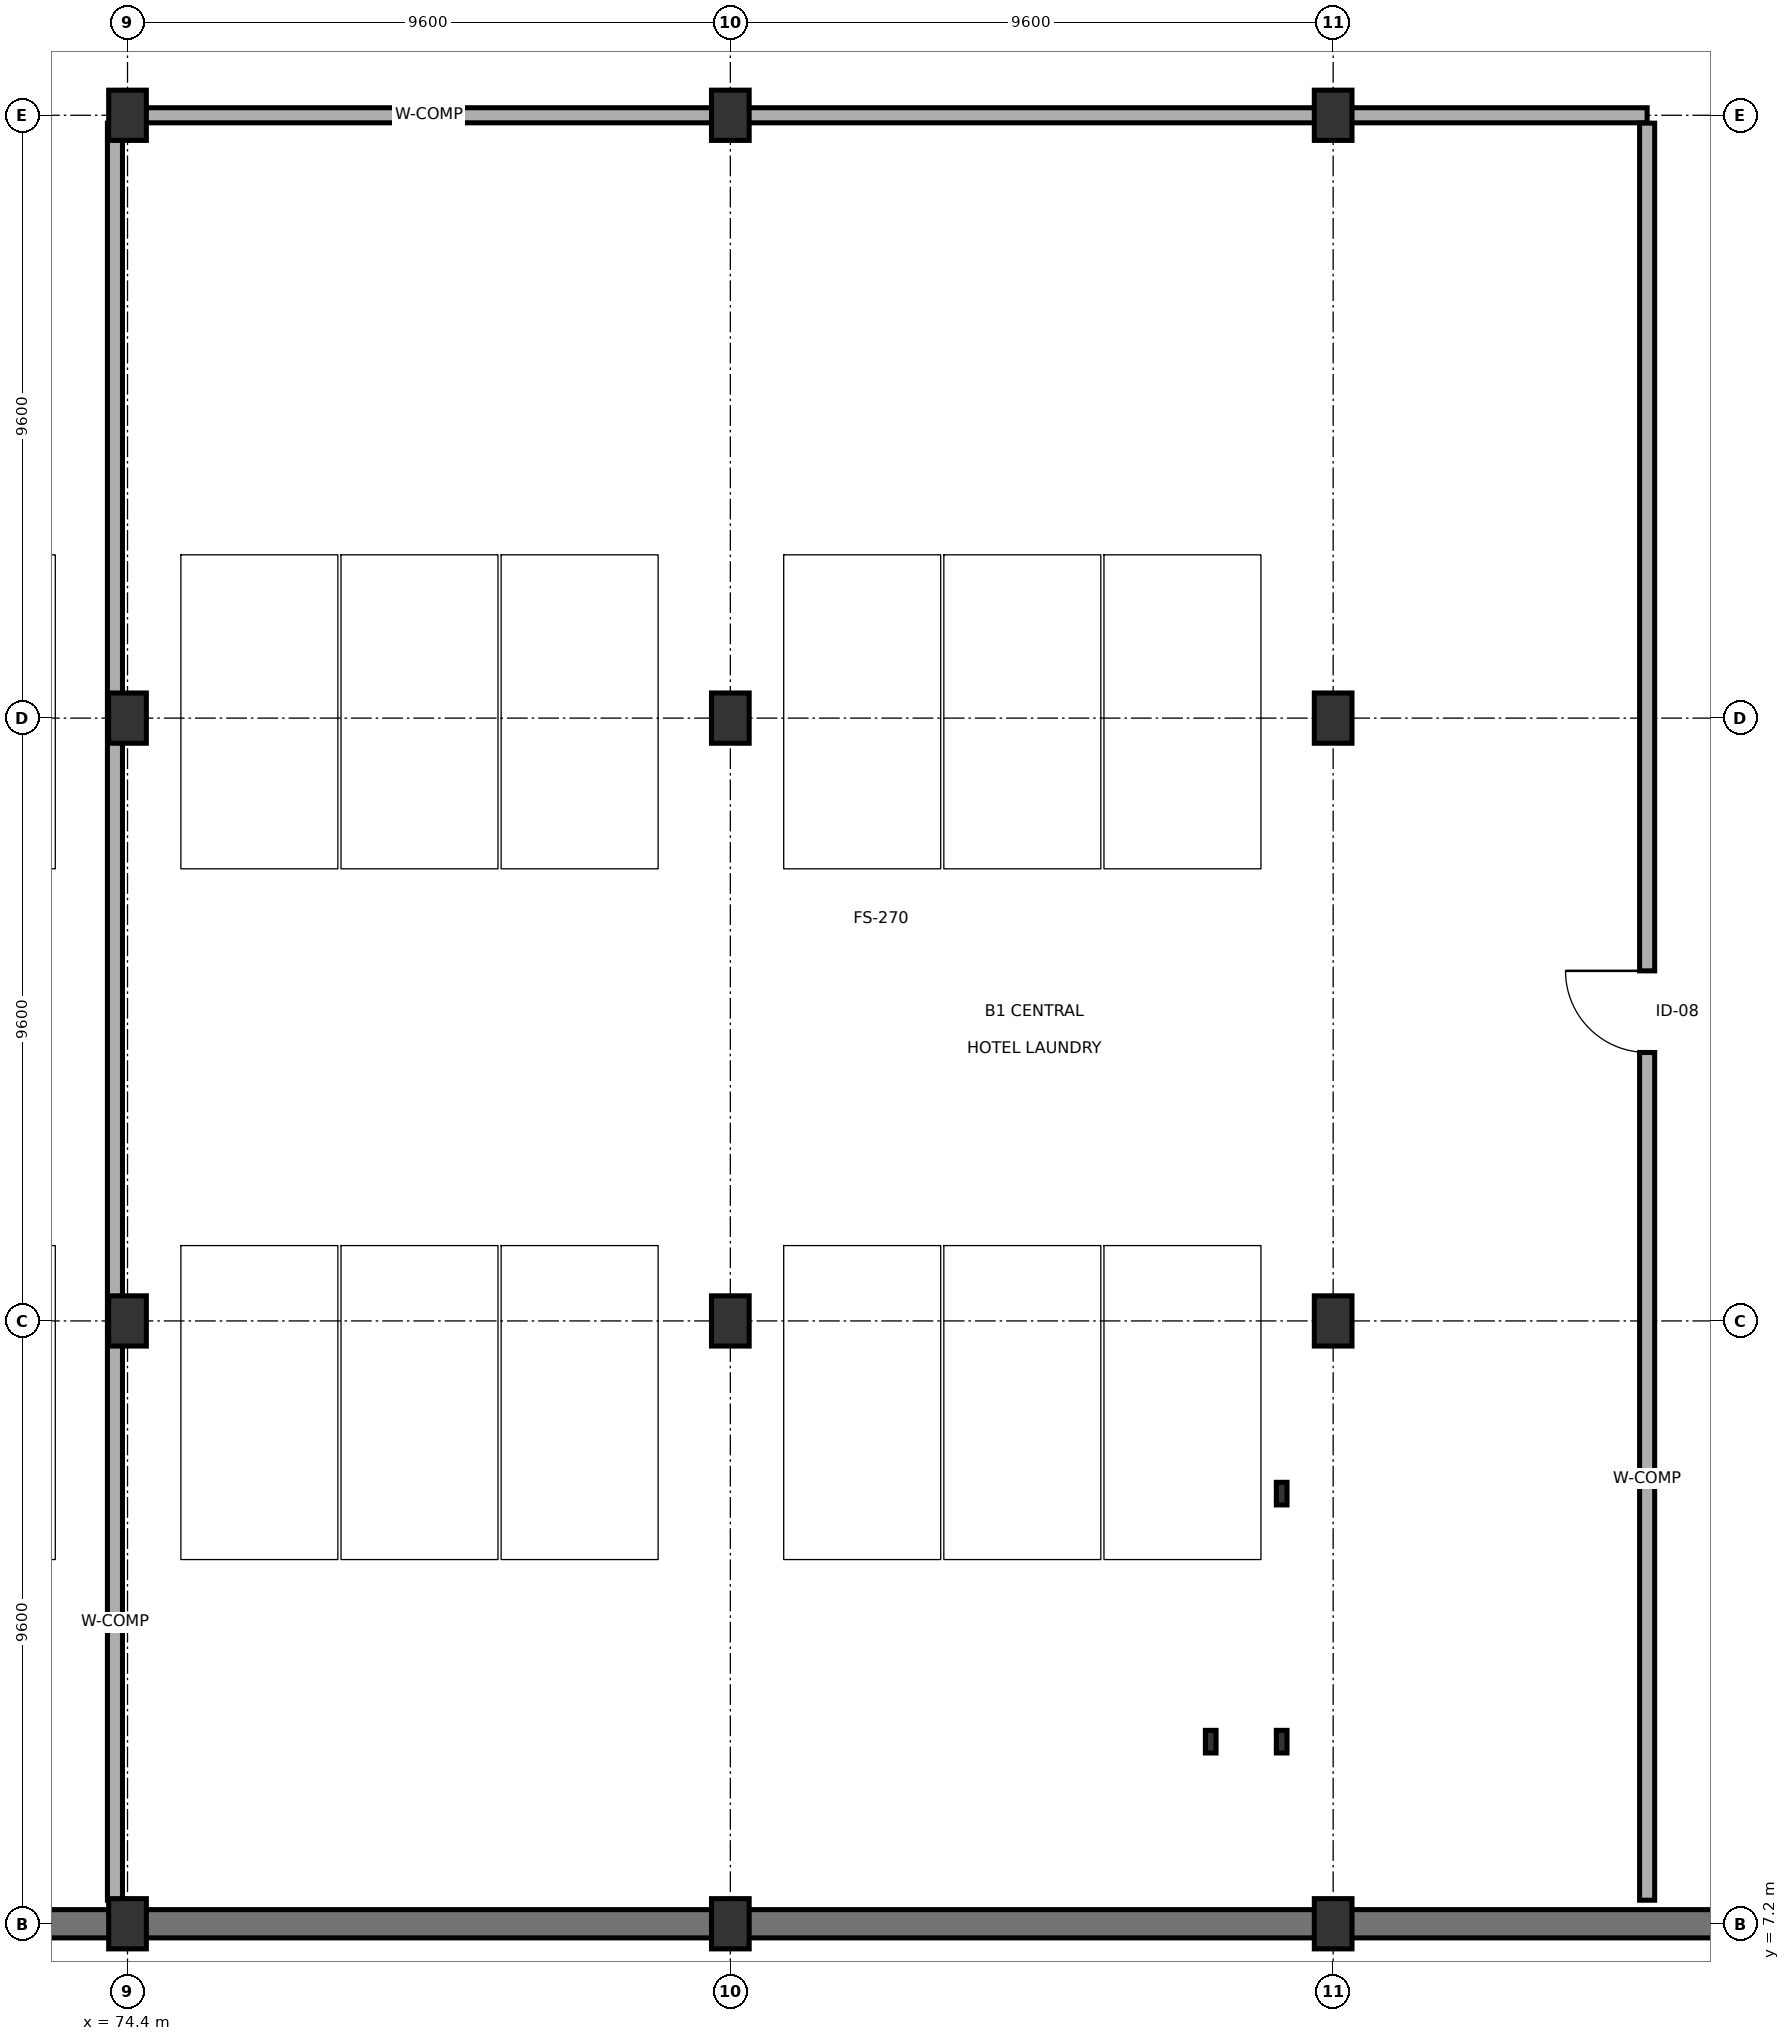
"""IFC4 building model, lengths in metres.
Left out: names, types, materials, properties, quantities, classifications, styles, units other than length and angle.
Written with IfcOpenShell. Run it as: python <this file> out.ifc"""

import sys

from ifc_helpers import new_model, si_unit, direction, frame, frame_2d, origin, origin_2d, place, context, subcontext, project, spatial, rectangle, i_section, extrude, element, fill, save


model = new_model("IFC4")
c1 = context("Model", 3, precision=1e-05, world=origin(), true_north=direction((0.0, 1.0)))
c2 = subcontext(c1, "Body", "Model", "MODEL_VIEW")
j1 = project(units=[si_unit("LENGTHUNIT", "METRE"), si_unit("PLANEANGLEUNIT", "RADIAN")], contexts=[c1])
p1 = place(None, origin())
s1 = spatial("IfcSite", under=j1, at=p1, CompositionType="ELEMENT")
p2 = place(p1, origin())
s2 = spatial("IfcBuilding", under=s1, at=p2, CompositionType="ELEMENT")
p3 = place(p2, frame((0.0, 0.0, -4.2)))
s3 = spatial("IfcBuildingStorey", under=s2, at=p3, CompositionType="ELEMENT", Elevation=-4.2)
for number, where, z_axis, x_axis in (
    (1, (74.4, 7.2, 0.0), (0.0, 0.0, 1.0), (1.0, 0.0, 0.0)),
    (2, (74.4, 16.8, 0.0), (0.0, 0.0, 1.0), (1.0, 0.0, 0.0)),
    (3, (74.4, 26.4, 0.0), (0.0, 0.0, 1.0), (1.0, 0.0, 0.0)),
    (4, (74.4, 36.0, 0.0), (0.0, 0.0, 1.0), (1.0, 0.0, 0.0)),
    (5, (84.0, 7.2, 0.0), (0.0, 0.0, 1.0), (1.0, 0.0, 0.0)),
    (6, (84.0, 16.8, 0.0), (0.0, 0.0, 1.0), (1.0, 0.0, 0.0)),
    (7, (84.0, 26.4, 0.0), (0.0, 0.0, 1.0), (1.0, 0.0, 0.0)),
    (8, (84.0, 36.0, 0.0), (0.0, 0.0, 1.0), (1.0, 0.0, 0.0)),
    (9, (93.6, 7.2, 0.0), (0.0, 0.0, 1.0), (1.0, 0.0, 0.0)),
    (10, (93.6, 16.8, 0.0), (0.0, 0.0, 1.0), (1.0, 0.0, 0.0)),
    (11, (93.6, 26.4, 0.0), (0.0, 0.0, 1.0), (1.0, 0.0, 0.0)),
    (12, (93.6, 36.0, 0.0), (0.0, 0.0, 1.0), (1.0, 0.0, 0.0)),
):
    element("IfcColumn", number, at=place(p3, frame(where, z_axis=z_axis, x_axis=x_axis)), inside=s3, PredefinedType="COLUMN", context=c2, shape_type="SweptSolid", body=[
        extrude(rectangle(XDim=0.6, YDim=0.8, at=origin_2d()), origin(), (0.0, 0.0, 1.0), 4.2),
    ])
for number, where, z_axis, x_axis in (
    (13, (91.65, 10.1, 0.0), (0.0, 0.0, 1.0), (1.0, 0.0, 0.0)),
    (14, (92.78, 10.1, 0.0), (0.0, 0.0, 1.0), (1.0, 0.0, 0.0)),
    (15, (92.78, 14.05, 0.0), (0.0, 0.0, 1.0), (1.0, 0.0, 0.0)),
):
    element("IfcColumn", number, at=place(p3, frame(where, z_axis=z_axis, x_axis=x_axis)), inside=s3, PredefinedType="PILASTER", context=c2, shape_type="SweptSolid", body=[
        extrude(i_section(OverallWidth=0.17, OverallDepth=0.36, WebThickness=0.008, FlangeThickness=0.013, FilletRadius=0.018, at=origin_2d()), origin(), (0.0, 0.0, 1.0), 4.2),
    ])
p4 = place(p3, frame((17.3, 7.2, 0.0), z_axis=(0.0, 0.0, 1.0), x_axis=(1.0, 0.0, 0.0)))
e16 = element("IfcWall", 16, at=p4, inside=s3, PredefinedType="SOLIDWALL", context=c2, shape_type="SweptSolid", body=[
    extrude(rectangle(XDim=138.2, YDim=0.45, at=frame_2d((69.1, 0.0))), origin(), (0.0, 0.0, 1.0), 3.88),
])
p5 = place(p3, frame((74.2, 36.0, 0.0), z_axis=(0.0, 0.0, 1.0), x_axis=(1.0, 0.0, 0.0)))
e17 = element("IfcWall", 17, at=p5, inside=s3, PredefinedType="SOLIDWALL", context=c2, shape_type="SweptSolid", body=[
    extrude(rectangle(XDim=24.4, YDim=0.24, at=frame_2d((12.2, 0.0))), origin(), (0.0, 0.0, 1.0), 3.325),
])
p6 = place(p3, frame((74.2, 7.575, 0.0), z_axis=(0.0, 0.0, 1.0), x_axis=(0.0, 1.0, 0.0)))
e18 = element("IfcWall", 18, at=p6, inside=s3, PredefinedType="SOLIDWALL", context=c2, shape_type="SweptSolid", body=[
    extrude(rectangle(XDim=28.3, YDim=0.24, at=frame_2d((14.15, 0.0))), origin(), (0.0, 0.0, 1.0), 3.325),
])
p7 = place(p3, frame((98.6, 7.575, 0.0), z_axis=(0.0, 0.0, 1.0), x_axis=(0.0, 1.0, 0.0)))
e19 = element("IfcWall", 19, at=p7, inside=s3, PredefinedType="SOLIDWALL", context=c2, shape_type="SweptSolid", body=[
    extrude(rectangle(XDim=28.3, YDim=0.24, at=frame_2d((14.15, 0.0))), origin(), (0.0, 0.0, 1.0), 3.325),
])
p8 = place(p7, frame((13.5, 0.0, 0.0)))
e20 = element("IfcOpeningElement", 20, at=p8, cuts=e19, PredefinedType="OPENING", context=c2, shape_type="SweptSolid", body=[
    extrude(rectangle(XDim=1.3, YDim=2.2, at=frame_2d((0.65, 1.1))), frame((0.0, 0.13, 0.0), z_axis=(0.0, -1.0, 0.0), x_axis=(1.0, 0.0, 0.0)), (0.0, 0.0, 1.0), 0.26),
])
p9 = place(p8, origin())
e21 = element("IfcDoor", 21, at=p9, inside=s3, OperationType="SINGLE_SWING_RIGHT", PredefinedType="DOOR", context=c2, shape_type="SweptSolid", body=[
    extrude(rectangle(XDim=1.3, YDim=2.2, at=frame_2d((0.65, 1.1))), frame((0.0, 0.025, 0.0), z_axis=(0.0, -1.0, 0.0), x_axis=(1.0, 0.0, 0.0)), (0.0, 0.0, 1.0), 0.05),
])
fill(e20, e21)
save(model, sys.argv[1])
